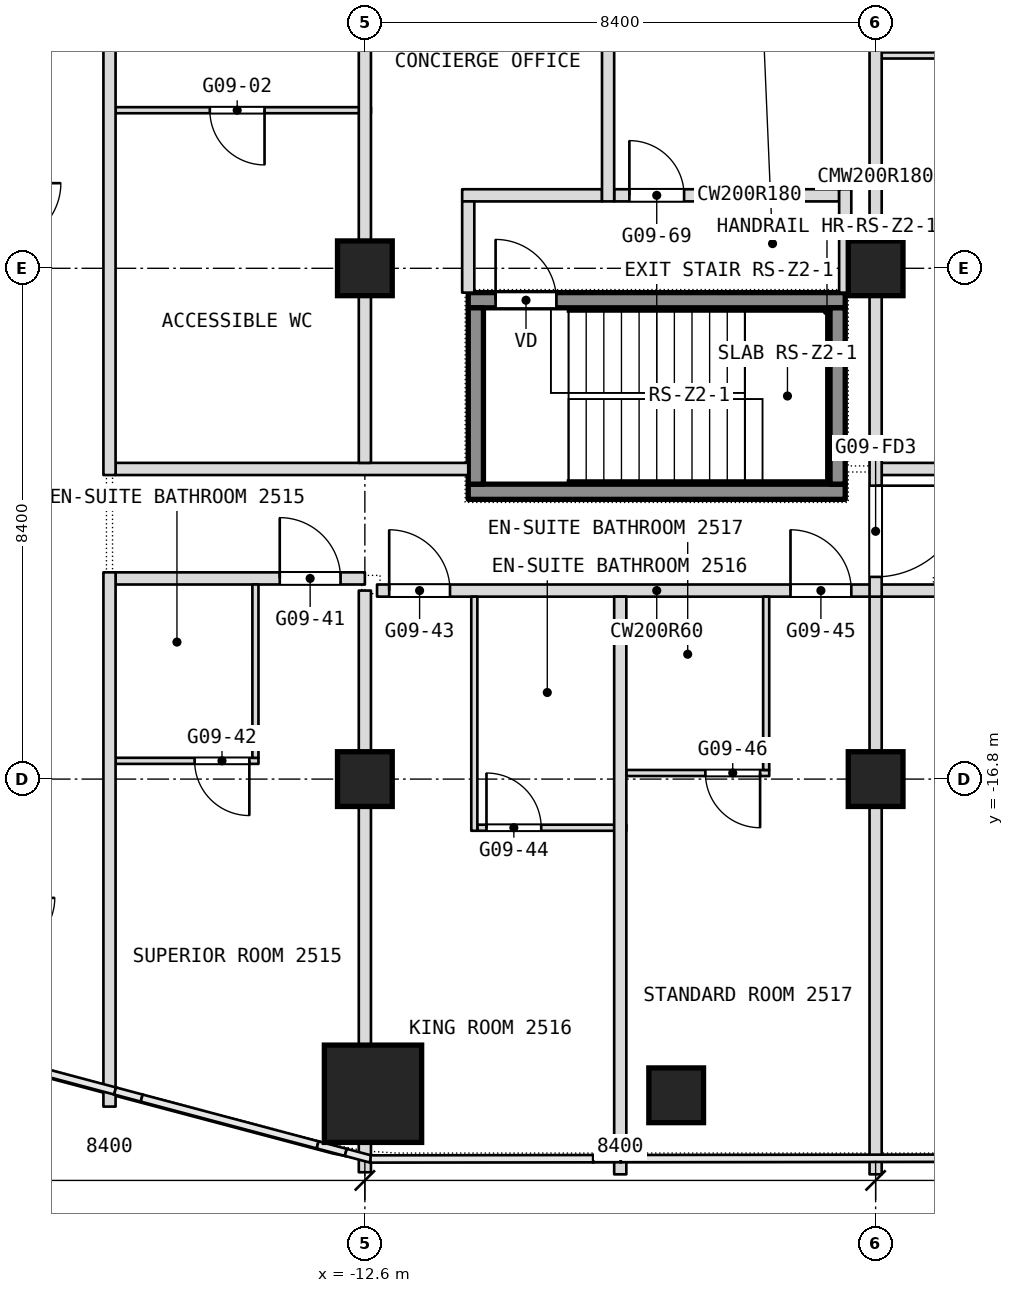
"""IFC4 building model, lengths in metres.
Left out: names, types, materials, properties, quantities, classifications, styles, units other than length and angle.
Written with IfcOpenShell. Run it as: python <this file> out.ifc"""

import sys

from ifc_helpers import new_model, si_unit, direction, frame, frame_2d, origin, origin_2d, place, context, subcontext, project, spatial, rectangle, extrude, element, fill, save


model = new_model("IFC4")
c1 = context("Model", 3, precision=1e-05, world=origin(), true_north=direction((0.0, 1.0)))
c2 = subcontext(c1, "Body", "Model", "MODEL_VIEW")
j1 = project(units=[si_unit("LENGTHUNIT", "METRE"), si_unit("PLANEANGLEUNIT", "RADIAN")], contexts=[c1])
p1 = place(None, origin())
s1 = spatial("IfcSite", under=j1, at=p1, CompositionType="ELEMENT")
p2 = place(p1, origin())
s2 = spatial("IfcBuilding", under=s1, at=p2, CompositionType="ELEMENT")
p3 = place(p2, frame((0.0, 0.0, 115.7)))
s3 = spatial("IfcBuildingStorey", under=s2, at=p3, CompositionType="ELEMENT", Elevation=115.7)
p4 = place(p3, frame((-12.466, -21.975, 0.0), z_axis=(0.0, 0.0, 1.0), x_axis=(1.0, 0.0, 0.0)))
e1 = element("IfcColumn", 1, at=p4, inside=s3, PredefinedType="COLUMN", context=c2, shape_type="SweptSolid", body=[
    extrude(rectangle(XDim=1.6, YDim=1.6, at=origin_2d()), origin(), (0.0, 0.0, 1.0), 3.6),
])
for number, where, z_axis, x_axis in (
    (2, (-12.6, -16.8, 0.0), (0.0, 0.0, 1.0), (1.0, 0.0, 0.0)),
    (3, (-12.6, -8.4, 0.0), (0.0, 0.0, 1.0), (1.0, 0.0, 0.0)),
    (4, (-4.2, -16.8, 0.0), (0.0, 0.0, 1.0), (1.0, 0.0, 0.0)),
    (5, (-4.2, -8.4, 0.0), (0.0, 0.0, 1.0), (1.0, 0.0, 0.0)),
    (6, (-7.48, -22.0, 0.0), (0.0, 0.0, 1.0), (1.0, 0.0, 0.0)),
):
    element("IfcColumn", number, at=place(p3, frame(where, z_axis=z_axis, x_axis=x_axis)), inside=s3, PredefinedType="COLUMN", context=c2, shape_type="SweptSolid", body=[
        extrude(rectangle(XDim=0.9, YDim=0.9, at=origin_2d()), origin(), (0.0, 0.0, 1.0), 3.6),
    ])
p5 = place(p3, frame((-10.75, -17.6, 0.0), z_axis=(0.0, 0.0, 1.0), x_axis=(1.0, 0.0, 0.0)))
e7 = element("IfcWall", 7, at=p5, inside=s3, PredefinedType="PARTITIONING", context=c2, shape_type="SweptSolid", body=[
    extrude(rectangle(XDim=2.45, YDim=0.1, at=frame_2d((1.225, 0.0))), origin(), (0.0, 0.0, 1.0), 3.34),
])
p6 = place(p5, frame((0.15, 0.0, 0.0)))
e8 = element("IfcOpeningElement", 8, at=p6, cuts=e7, PredefinedType="OPENING", context=c2, shape_type="SweptSolid", body=[
    extrude(rectangle(XDim=0.9, YDim=2.1, at=frame_2d((0.45, 1.05))), frame((0.0, 0.05, 0.0), z_axis=(0.0, -1.0, 0.0), x_axis=(1.0, 0.0, 0.0)), (0.0, 0.0, 1.0), 0.1),
])
p7 = place(p3, frame((-8.3, -16.7, 0.0), z_axis=(0.0, 0.0, 1.0), x_axis=(1.0, 0.0, 0.0)))
e9 = element("IfcWall", 9, at=p7, inside=s3, PredefinedType="PARTITIONING", context=c2, shape_type="SweptSolid", body=[
    extrude(rectangle(XDim=2.35, YDim=0.1, at=frame_2d((1.175, 0.0))), origin(), (0.0, 0.0, 1.0), 2.89),
])
p8 = place(p7, frame((1.3, 0.0, 0.0)))
e10 = element("IfcOpeningElement", 10, at=p8, cuts=e9, PredefinedType="OPENING", context=c2, shape_type="SweptSolid", body=[
    extrude(rectangle(XDim=0.9, YDim=2.1, at=frame_2d((0.45, 1.05))), frame((0.0, 0.05, 0.0), z_axis=(0.0, -1.0, 0.0), x_axis=(1.0, 0.0, 0.0)), (0.0, 0.0, 1.0), 0.1),
])
p9 = place(p3, frame((-16.7, -16.5, 0.0), z_axis=(0.0, 0.0, 1.0), x_axis=(1.0, 0.0, 0.0)))
e11 = element("IfcWall", 11, at=p9, inside=s3, PredefinedType="PARTITIONING", context=c2, shape_type="SweptSolid", body=[
    extrude(rectangle(XDim=2.35, YDim=0.1, at=frame_2d((1.175, 0.0))), origin(), (0.0, 0.0, 1.0), 3.34),
])
p10 = place(p9, frame((1.3, 0.0, 0.0)))
e12 = element("IfcOpeningElement", 12, at=p10, cuts=e11, PredefinedType="OPENING", context=c2, shape_type="SweptSolid", body=[
    extrude(rectangle(XDim=0.9, YDim=2.1, at=frame_2d((0.45, 1.05))), frame((0.0, 0.05, 0.0), z_axis=(0.0, -1.0, 0.0), x_axis=(1.0, 0.0, 0.0)), (0.0, 0.0, 1.0), 0.1),
])
p11 = place(p3, frame((-12.4, -13.7, 0.0), z_axis=(0.0, 0.0, 1.0), x_axis=(1.0, 0.0, 0.0)))
e13 = element("IfcWall", 13, at=p11, inside=s3, PredefinedType="PARTITIONING", context=c2, shape_type="SweptSolid", body=[
    extrude(rectangle(XDim=9.2, YDim=0.2, at=frame_2d((4.6, 0.0))), origin(), (0.0, 0.0, 1.0), 3.34),
])
p12 = place(p11, frame((0.2, 0.0, 0.0)))
e14 = element("IfcOpeningElement", 14, at=p12, cuts=e13, PredefinedType="OPENING", context=c2, shape_type="SweptSolid", body=[
    extrude(rectangle(XDim=1.0, YDim=2.1, at=frame_2d((0.5, 1.05))), frame((0.0, 0.1, 0.0), z_axis=(0.0, -1.0, 0.0), x_axis=(1.0, 0.0, 0.0)), (0.0, 0.0, 1.0), 0.2),
])
p13 = place(p11, frame((6.8, 0.0, 0.0)))
e15 = element("IfcOpeningElement", 15, at=p13, cuts=e13, PredefinedType="OPENING", context=c2, shape_type="SweptSolid", body=[
    extrude(rectangle(XDim=1.0, YDim=2.1, at=frame_2d((0.5, 1.05))), frame((0.0, 0.1, 0.0), z_axis=(0.0, -1.0, 0.0), x_axis=(1.0, 0.0, 0.0)), (0.0, 0.0, 1.0), 0.2),
])
p14 = place(p3, frame((-16.7, -13.5, 0.0), z_axis=(0.0, 0.0, 1.0), x_axis=(1.0, 0.0, 0.0)))
e16 = element("IfcWall", 16, at=p14, inside=s3, PredefinedType="PARTITIONING", context=c2, shape_type="SweptSolid", body=[
    extrude(rectangle(XDim=4.1, YDim=0.2, at=frame_2d((2.05, 0.0))), origin(), (0.0, 0.0, 1.0), 3.34),
])
p15 = place(p14, frame((2.7, 0.0, 0.0)))
e17 = element("IfcOpeningElement", 17, at=p15, cuts=e16, PredefinedType="OPENING", context=c2, shape_type="SweptSolid", body=[
    extrude(rectangle(XDim=1.0, YDim=2.1, at=frame_2d((0.5, 1.05))), frame((0.0, 0.1, 0.0), z_axis=(0.0, -1.0, 0.0), x_axis=(1.0, 0.0, 0.0)), (0.0, 0.0, 1.0), 0.2),
])
p16 = place(p3, frame((-16.7, -11.7, 0.0), z_axis=(0.0, 0.0, 1.0), x_axis=(1.0, 0.0, 0.0)))
e18 = element("IfcWall", 18, at=p16, inside=s3, PredefinedType="PARTITIONING", context=c2, shape_type="SweptSolid", body=[
    extrude(rectangle(XDim=5.8, YDim=0.2, at=frame_2d((2.9, 0.0))), origin(), (0.0, 0.0, 1.0), 3.34),
])
p17 = place(p3, frame((-4.1, -11.7, 0.0), z_axis=(0.0, 0.0, 1.0), x_axis=(1.0, 0.0, 0.0)))
e19 = element("IfcWall", 19, at=p17, inside=s3, PredefinedType="PARTITIONING", context=c2, shape_type="SweptSolid", body=[
    extrude(rectangle(XDim=20.8, YDim=0.2, at=frame_2d((10.4, 0.0))), origin(), (0.0, 0.0, 1.0), 3.34),
])
p18 = place(p3, frame((-11.0, -7.2, 0.0), z_axis=(0.0, 0.0, 1.0), x_axis=(1.0, 0.0, 0.0)))
e20 = element("IfcWall", 20, at=p18, inside=s3, PredefinedType="PARTITIONING", context=c2, shape_type="SweptSolid", body=[
    extrude(rectangle(XDim=2.3, YDim=0.2, at=frame_2d((1.15, 0.0))), origin(), (0.0, 0.0, 1.0), 3.34),
])
p19 = place(p3, frame((-8.5, -7.2, 0.0), z_axis=(0.0, 0.0, 1.0), x_axis=(1.0, 0.0, 0.0)))
e21 = element("IfcWall", 21, at=p19, inside=s3, PredefinedType="PARTITIONING", context=c2, shape_type="SweptSolid", body=[
    extrude(rectangle(XDim=3.7, YDim=0.2, at=frame_2d((1.85, 0.0))), origin(), (0.0, 0.0, 1.0), 3.34),
])
p20 = place(p19, frame((0.25, 0.0, 0.0)))
e22 = element("IfcOpeningElement", 22, at=p20, cuts=e21, PredefinedType="OPENING", context=c2, shape_type="SweptSolid", body=[
    extrude(rectangle(XDim=0.9, YDim=2.1, at=frame_2d((0.45, 1.05))), frame((0.0, 0.1, 0.0), z_axis=(0.0, -1.0, 0.0), x_axis=(1.0, 0.0, 0.0)), (0.0, 0.0, 1.0), 0.2),
])
p21 = place(p3, frame((-16.7, -5.8, 0.0), z_axis=(0.0, 0.0, 1.0), x_axis=(1.0, 0.0, 0.0)))
e23 = element("IfcWall", 23, at=p21, inside=s3, PredefinedType="PARTITIONING", context=c2, shape_type="SweptSolid", body=[
    extrude(rectangle(XDim=4.2, YDim=0.1, at=frame_2d((2.1, 0.0))), origin(), (0.0, 0.0, 1.0), 3.34),
])
p22 = place(p21, frame((1.55, 0.0, 0.0)))
e24 = element("IfcOpeningElement", 24, at=p22, cuts=e23, PredefinedType="OPENING", context=c2, shape_type="SweptSolid", body=[
    extrude(rectangle(XDim=0.9, YDim=2.1, at=frame_2d((0.45, 1.05))), frame((0.0, 0.05, 0.0), z_axis=(0.0, -1.0, 0.0), x_axis=(1.0, 0.0, 0.0)), (0.0, 0.0, 1.0), 0.1),
])
p23 = place(p3, frame((-4.1, -4.9, 0.0), z_axis=(0.0, 0.0, 1.0), x_axis=(1.0, 0.0, 0.0)))
e25 = element("IfcWall", 25, at=p23, inside=s3, PredefinedType="PARTITIONING", context=c2, shape_type="SweptSolid", body=[
    extrude(rectangle(XDim=4.2, YDim=0.1, at=frame_2d((2.1, 0.0))), origin(), (0.0, 0.0, 1.0), 3.34),
])
p24 = place(p23, frame((1.55, 0.0, 0.0)))
e26 = element("IfcOpeningElement", 26, at=p24, cuts=e25, PredefinedType="OPENING", context=c2, shape_type="SweptSolid", body=[
    extrude(rectangle(XDim=0.9, YDim=2.1, at=frame_2d((0.45, 1.05))), frame((0.0, 0.05, 0.0), z_axis=(0.0, -1.0, 0.0), x_axis=(1.0, 0.0, 0.0)), (0.0, 0.0, 1.0), 0.1),
])
p25 = place(p3, frame((-4.2, -23.3, 0.0), z_axis=(0.0, 0.0, 1.0), x_axis=(0.0, 1.0, 0.0)))
e27 = element("IfcWall", 27, at=p25, inside=s3, PredefinedType="PARTITIONING", context=c2, shape_type="SweptSolid", body=[
    extrude(rectangle(XDim=9.5, YDim=0.2, at=frame_2d((4.75, 0.0))), origin(), (0.0, 0.0, 1.0), 3.34),
])
p26 = place(p3, frame((-4.2, -13.8, 0.0), z_axis=(0.0, 0.0, 1.0), x_axis=(0.0, 1.0, 0.0)))
e28 = element("IfcWall", 28, at=p26, inside=s3, PredefinedType="PARTITIONING", context=c2, shape_type="SweptSolid", body=[
    extrude(rectangle(XDim=13.8, YDim=0.2, at=frame_2d((6.9, 0.0))), origin(), (0.0, 0.0, 1.0), 3.34),
])
p27 = place(p26, frame((12.15, 0.0, 0.0)))
e29 = element("IfcOpeningElement", 29, at=p27, cuts=e28, PredefinedType="OPENING", context=c2, shape_type="SweptSolid", body=[
    extrude(rectangle(XDim=1.5, YDim=2.1, at=frame_2d((0.75, 1.05))), frame((0.0, 0.1, 0.0), z_axis=(0.0, -1.0, 0.0), x_axis=(1.0, 0.0, 0.0)), (0.0, 0.0, 1.0), 0.2),
])
p28 = place(p26, frame((0.325, 0.0, 0.0)))
e30 = element("IfcOpeningElement", 30, at=p28, cuts=e28, PredefinedType="OPENING", context=c2, shape_type="SweptSolid", body=[
    extrude(rectangle(XDim=1.5, YDim=2.1, at=frame_2d((0.75, 1.05))), frame((0.0, 0.1, 0.0), z_axis=(0.0, -1.0, 0.0), x_axis=(1.0, 0.0, 0.0)), (0.0, 0.0, 1.0), 0.2),
])
p29 = place(p3, frame((-4.7, -8.8, 0.0), z_axis=(0.0, 0.0, 1.0), x_axis=(0.0, 1.0, 0.0)))
e31 = element("IfcWall", 31, at=p29, inside=s3, PredefinedType="PARTITIONING", context=c2, shape_type="SweptSolid", body=[
    extrude(rectangle(XDim=1.7, YDim=0.2, at=frame_2d((0.85, 0.0))), origin(), (0.0, 0.0, 1.0), 3.34),
])
p30 = place(p3, frame((-6.0, -16.65, 0.0), z_axis=(0.0, 0.0, 1.0), x_axis=(0.0, 1.0, 0.0)))
e32 = element("IfcWall", 32, at=p30, inside=s3, PredefinedType="PARTITIONING", context=c2, shape_type="SweptSolid", body=[
    extrude(rectangle(XDim=2.85, YDim=0.1, at=frame_2d((1.425, 0.0))), origin(), (0.0, 0.0, 1.0), 3.34),
])
p31 = place(p3, frame((-8.4, -23.3, 0.0), z_axis=(0.0, 0.0, 1.0), x_axis=(0.0, 1.0, 0.0)))
e33 = element("IfcWall", 33, at=p31, inside=s3, PredefinedType="PARTITIONING", context=c2, shape_type="SweptSolid", body=[
    extrude(rectangle(XDim=9.5, YDim=0.2, at=frame_2d((4.75, 0.0))), origin(), (0.0, 0.0, 1.0), 3.34),
])
p32 = place(p3, frame((-8.6, -7.3, 0.0), z_axis=(0.0, 0.0, 1.0), x_axis=(0.0, 1.0, 0.0)))
e34 = element("IfcWall", 34, at=p32, inside=s3, PredefinedType="PARTITIONING", context=c2, shape_type="SweptSolid", body=[
    extrude(rectangle(XDim=5.6, YDim=0.2, at=frame_2d((2.8, 0.0))), origin(), (0.0, 0.0, 1.0), 3.34),
])
p33 = place(p3, frame((-10.8, -17.65, 0.0), z_axis=(0.0, 0.0, 1.0), x_axis=(0.0, 1.0, 0.0)))
e35 = element("IfcWall", 35, at=p33, inside=s3, PredefinedType="PARTITIONING", context=c2, shape_type="SweptSolid", body=[
    extrude(rectangle(XDim=3.85, YDim=0.1, at=frame_2d((1.925, 0.0))), origin(), (0.0, 0.0, 1.0), 3.34),
])
p34 = place(p3, frame((-10.9, -8.8, 0.0), z_axis=(0.0, 0.0, 1.0), x_axis=(0.0, 1.0, 0.0)))
e36 = element("IfcWall", 36, at=p34, inside=s3, PredefinedType="PARTITIONING", context=c2, shape_type="SweptSolid", body=[
    extrude(rectangle(XDim=1.5, YDim=0.2, at=frame_2d((0.75, 0.0))), origin(), (0.0, 0.0, 1.0), 3.34),
])
p35 = place(p3, frame((-12.6, -23.266, 0.0), z_axis=(0.0, 0.0, 1.0), x_axis=(0.0, 1.0, 0.0)))
e37 = element("IfcWall", 37, at=p35, inside=s3, PredefinedType="PARTITIONING", context=c2, shape_type="SweptSolid", body=[
    extrude(rectangle(XDim=0.491, YDim=0.2, at=frame_2d((0.246, 0.0))), origin(), (0.0, 0.0, 1.0), 3.34),
])
p36 = place(p3, frame((-12.6, -21.175, 0.0), z_axis=(0.0, 0.0, 1.0), x_axis=(0.0, 1.0, 0.0)))
e38 = element("IfcWall", 38, at=p36, inside=s3, PredefinedType="PARTITIONING", context=c2, shape_type="SweptSolid", body=[
    extrude(rectangle(XDim=7.475, YDim=0.2, at=frame_2d((3.738, 0.0))), origin(), (0.0, 0.0, 1.0), 3.34),
])
p37 = place(p3, frame((-12.6, -11.6, 0.0), z_axis=(0.0, 0.0, 1.0), x_axis=(0.0, 1.0, 0.0)))
e39 = element("IfcWall", 39, at=p37, inside=s3, PredefinedType="PARTITIONING", context=c2, shape_type="SweptSolid", body=[
    extrude(rectangle(XDim=9.7, YDim=0.2, at=frame_2d((4.85, 0.0))), origin(), (0.0, 0.0, 1.0), 3.34),
])
p38 = place(p3, frame((-14.4, -16.45, 0.0), z_axis=(0.0, 0.0, 1.0), x_axis=(0.0, 1.0, 0.0)))
e40 = element("IfcWall", 40, at=p38, inside=s3, PredefinedType="PARTITIONING", context=c2, shape_type="SweptSolid", body=[
    extrude(rectangle(XDim=2.85, YDim=0.1, at=frame_2d((1.425, 0.0))), origin(), (0.0, 0.0, 1.0), 3.34),
])
p39 = place(p3, frame((-16.8, -22.186, 0.0), z_axis=(0.0, 0.0, 1.0), x_axis=(0.0, 1.0, 0.0)))
e41 = element("IfcWall", 41, at=p39, inside=s3, PredefinedType="PARTITIONING", context=c2, shape_type="SweptSolid", body=[
    extrude(rectangle(XDim=8.786, YDim=0.2, at=frame_2d((4.393, 0.0))), origin(), (0.0, 0.0, 1.0), 3.34),
])
p40 = place(p3, frame((-16.8, -11.8, 0.0), z_axis=(0.0, 0.0, 1.0), x_axis=(0.0, 1.0, 0.0)))
e42 = element("IfcWall", 42, at=p40, inside=s3, PredefinedType="PARTITIONING", context=c2, shape_type="SweptSolid", body=[
    extrude(rectangle(XDim=9.9, YDim=0.2, at=frame_2d((4.95, 0.0))), origin(), (0.0, 0.0, 1.0), 3.34),
])
p41 = place(p3, frame((-10.9, -12.075, 0.1), z_axis=(0.0, 0.0, 1.0), x_axis=(1.0, 0.0, 0.0)))
e43 = element("IfcWall", 43, at=p41, inside=s3, PredefinedType="SHEAR", context=c2, shape_type="SweptSolid", body=[
    extrude(rectangle(XDim=6.2, YDim=0.25, at=frame_2d((3.1, 0.0))), origin(), (0.0, 0.0, 1.0), 3.6),
])
p42 = place(p3, frame((-10.9, -8.925, 0.1), z_axis=(0.0, 0.0, 1.0), x_axis=(1.0, 0.0, 0.0)))
e44 = element("IfcWall", 44, at=p42, inside=s3, PredefinedType="SHEAR", context=c2, shape_type="SweptSolid", body=[
    extrude(rectangle(XDim=6.2, YDim=0.25, at=frame_2d((3.1, 0.0))), origin(), (0.0, 0.0, 1.0), 3.6),
])
p43 = place(p42, frame((0.45, 0.0, 0.0)))
e45 = element("IfcOpeningElement", 45, at=p43, cuts=e44, PredefinedType="OPENING", context=c2, shape_type="SweptSolid", body=[
    extrude(rectangle(XDim=1.0, YDim=2.1, at=frame_2d((0.5, 1.05))), frame((0.0, 0.125, 0.0), z_axis=(0.0, -1.0, 0.0), x_axis=(1.0, 0.0, 0.0)), (0.0, 0.0, 1.0), 0.25),
])
for number, where, z_axis, x_axis in (
    (46, (-10.775, -11.95, 0.1), (0.0, 0.0, 1.0), (0.0, 1.0, 0.0)),
    (47, (-4.825, -11.95, 0.1), (0.0, 0.0, 1.0), (0.0, 1.0, 0.0)),
):
    element("IfcWall", number, at=place(p3, frame(where, z_axis=z_axis, x_axis=x_axis)), inside=s3, PredefinedType="SHEAR", context=c2, shape_type="SweptSolid", body=[
        extrude(rectangle(XDim=2.9, YDim=0.25, at=frame_2d((1.45, 0.0))), origin(), (0.0, 0.0, 1.0), 3.6),
    ])
p44 = place(p6, origin())
e48 = element("IfcDoor", 48, at=p44, inside=s3, OperationType="SINGLE_SWING_LEFT", PredefinedType="DOOR", context=c2, shape_type="SweptSolid", body=[
    extrude(rectangle(XDim=0.9, YDim=2.1, at=frame_2d((0.45, 1.05))), frame((0.0, 0.025, 0.0), z_axis=(0.0, -1.0, 0.0), x_axis=(1.0, 0.0, 0.0)), (0.0, 0.0, 1.0), 0.05),
])
fill(e8, e48)
p45 = place(p8, origin())
e49 = element("IfcDoor", 49, at=p45, inside=s3, OperationType="SINGLE_SWING_RIGHT", PredefinedType="DOOR", context=c2, shape_type="SweptSolid", body=[
    extrude(rectangle(XDim=0.9, YDim=2.1, at=frame_2d((0.45, 1.05))), frame((0.0, 0.025, 0.0), z_axis=(0.0, -1.0, 0.0), x_axis=(1.0, 0.0, 0.0)), (0.0, 0.0, 1.0), 0.05),
])
fill(e10, e49)
p46 = place(p10, origin())
e50 = element("IfcDoor", 50, at=p46, inside=s3, OperationType="SINGLE_SWING_RIGHT", PredefinedType="DOOR", context=c2, shape_type="SweptSolid", body=[
    extrude(rectangle(XDim=0.9, YDim=2.1, at=frame_2d((0.45, 1.05))), frame((0.0, 0.025, 0.0), z_axis=(0.0, -1.0, 0.0), x_axis=(1.0, 0.0, 0.0)), (0.0, 0.0, 1.0), 0.05),
])
fill(e12, e50)
p47 = place(p12, origin())
e51 = element("IfcDoor", 51, at=p47, inside=s3, OperationType="SINGLE_SWING_RIGHT", PredefinedType="DOOR", context=c2, shape_type="SweptSolid", body=[
    extrude(rectangle(XDim=1.0, YDim=2.1, at=frame_2d((0.5, 1.05))), frame((0.0, 0.025, 0.0), z_axis=(0.0, -1.0, 0.0), x_axis=(1.0, 0.0, 0.0)), (0.0, 0.0, 1.0), 0.05),
])
fill(e14, e51)
p48 = place(p13, origin())
e52 = element("IfcDoor", 52, at=p48, inside=s3, OperationType="SINGLE_SWING_LEFT", PredefinedType="DOOR", context=c2, shape_type="SweptSolid", body=[
    extrude(rectangle(XDim=1.0, YDim=2.1, at=frame_2d((0.5, 1.05))), frame((0.0, 0.025, 0.0), z_axis=(0.0, -1.0, 0.0), x_axis=(1.0, 0.0, 0.0)), (0.0, 0.0, 1.0), 0.05),
])
fill(e15, e52)
p49 = place(p15, origin())
e53 = element("IfcDoor", 53, at=p49, inside=s3, OperationType="SINGLE_SWING_LEFT", PredefinedType="DOOR", context=c2, shape_type="SweptSolid", body=[
    extrude(rectangle(XDim=1.0, YDim=2.1, at=frame_2d((0.5, 1.05))), frame((0.0, 0.025, 0.0), z_axis=(0.0, -1.0, 0.0), x_axis=(1.0, 0.0, 0.0)), (0.0, 0.0, 1.0), 0.05),
])
fill(e17, e53)
p50 = place(p20, origin())
e54 = element("IfcDoor", 54, at=p50, inside=s3, OperationType="SINGLE_SWING_RIGHT", PredefinedType="DOOR", context=c2, shape_type="SweptSolid", body=[
    extrude(rectangle(XDim=0.9, YDim=2.1, at=frame_2d((0.45, 1.05))), frame((0.0, 0.025, 0.0), z_axis=(0.0, -1.0, 0.0), x_axis=(1.0, 0.0, 0.0)), (0.0, 0.0, 1.0), 0.05),
])
fill(e22, e54)
p51 = place(p22, origin())
e55 = element("IfcDoor", 55, at=p51, inside=s3, OperationType="SINGLE_SWING_RIGHT", PredefinedType="DOOR", context=c2, shape_type="SweptSolid", body=[
    extrude(rectangle(XDim=0.9, YDim=2.1, at=frame_2d((0.45, 1.05))), frame((0.0, 0.025, 0.0), z_axis=(0.0, -1.0, 0.0), x_axis=(1.0, 0.0, 0.0)), (0.0, 0.0, 1.0), 0.05),
])
fill(e24, e55)
p52 = place(p43, origin())
e56 = element("IfcDoor", 56, at=p52, inside=s3, OperationType="SINGLE_SWING_LEFT", PredefinedType="DOOR", context=c2, shape_type="SweptSolid", body=[
    extrude(rectangle(XDim=1.0, YDim=2.1, at=frame_2d((0.5, 1.05))), frame((0.0, 0.025, 0.0), z_axis=(0.0, -1.0, 0.0), x_axis=(1.0, 0.0, 0.0)), (0.0, 0.0, 1.0), 0.05),
])
fill(e45, e56)
p53 = place(p28, origin())
e57 = element("IfcDoor", 57, at=p53, inside=s3, OperationType="DOUBLE_DOOR_DOUBLE_SWING", PredefinedType="DOOR", context=c2, shape_type="SweptSolid", body=[
    extrude(rectangle(XDim=1.5, YDim=2.1, at=frame_2d((0.75, 1.05))), frame((0.0, 0.025, 0.0), z_axis=(0.0, -1.0, 0.0), x_axis=(1.0, 0.0, 0.0)), (0.0, 0.0, 1.0), 0.05),
])
fill(e30, e57)
save(model, sys.argv[1])
